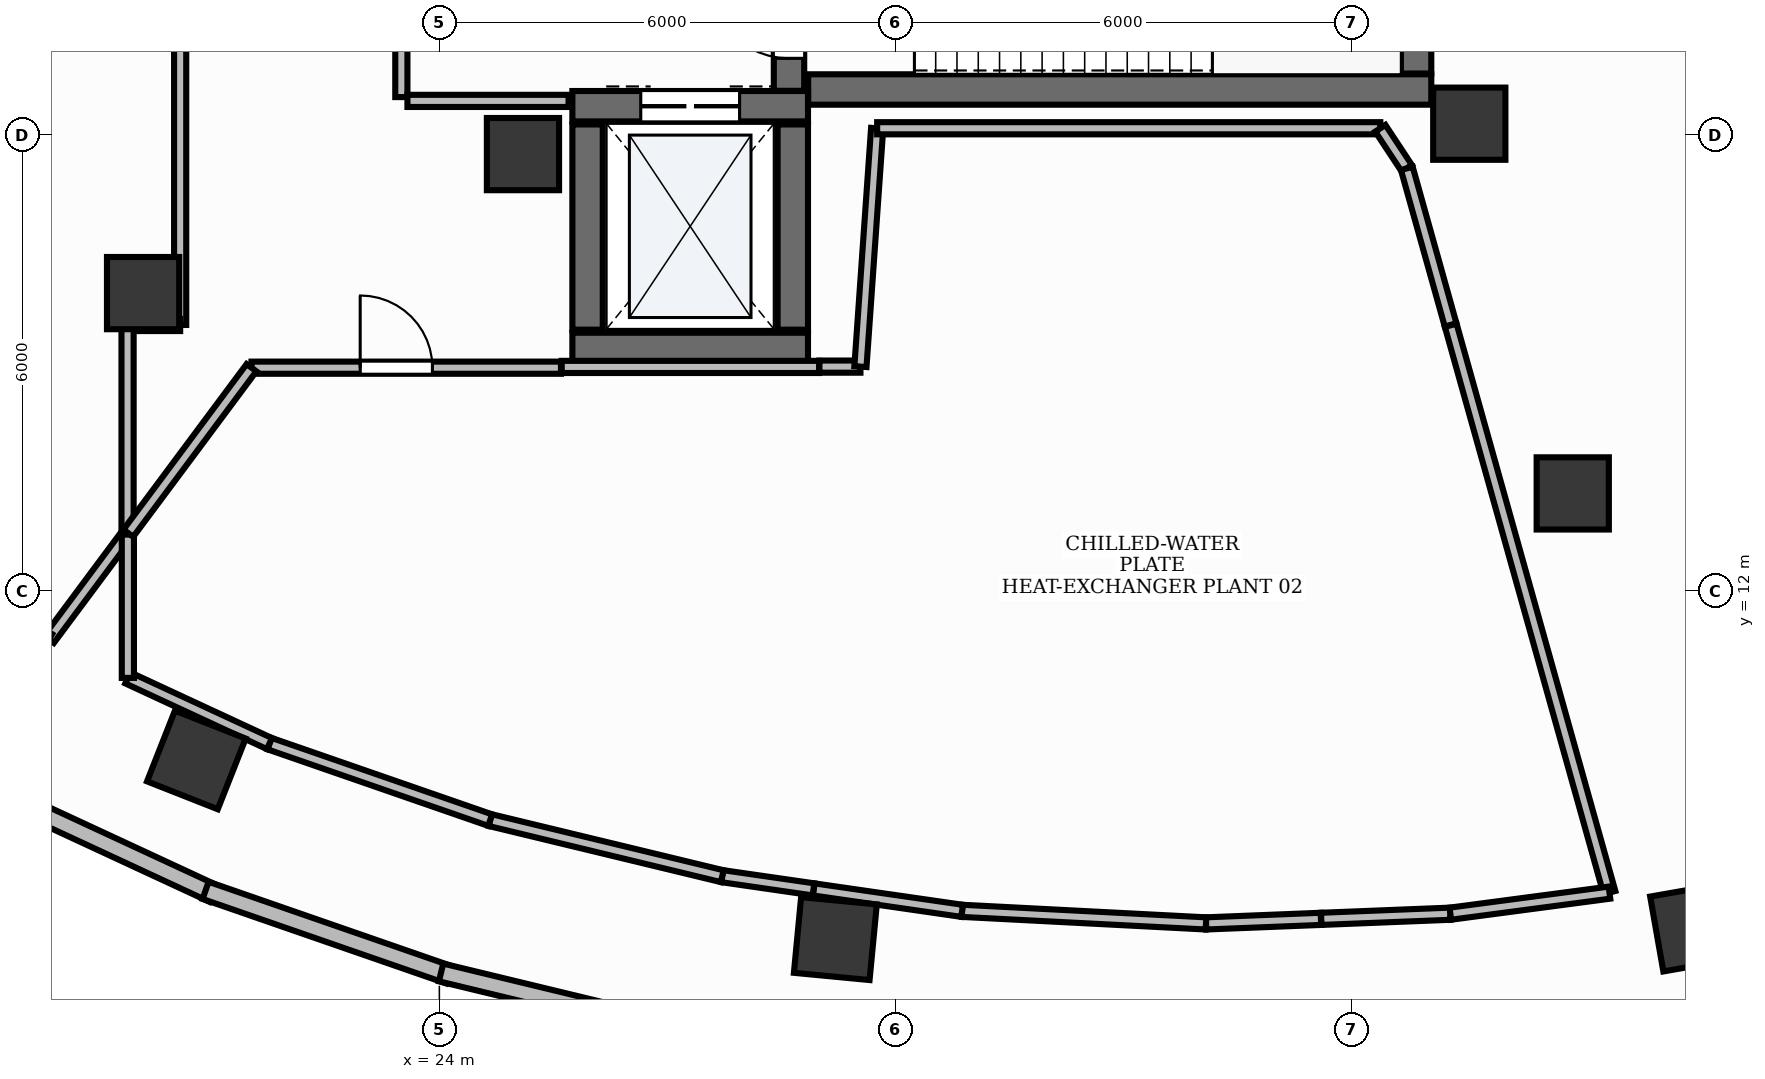
"""IFC4 building model, lengths in metres.
Left out: names, types, materials, properties, quantities, classifications, styles, units other than length and angle.
Written with IfcOpenShell. Run it as: python <this file> out.ifc"""

import sys

from ifc_helpers import new_model, si_unit, direction, frame, frame_2d, origin, origin_2d, place, context, subcontext, project, spatial, rectangle, extrude, element, fill, save


model = new_model("IFC4")
c1 = context("Model", 3, precision=1e-05, world=origin(), true_north=direction((0.0, 1.0)))
c2 = subcontext(c1, "Body", "Model", "MODEL_VIEW")
j1 = project(units=[si_unit("LENGTHUNIT", "METRE"), si_unit("PLANEANGLEUNIT", "RADIAN")], contexts=[c1])
p1 = place(None, origin())
s1 = spatial("IfcSite", under=j1, at=p1, CompositionType="ELEMENT")
p2 = place(p1, origin())
s2 = spatial("IfcBuilding", under=s1, at=p2, CompositionType="ELEMENT")
p3 = place(p2, frame((0.0, 0.0, 213.0)))
s3 = spatial("IfcBuildingStorey", under=s2, at=p3, CompositionType="ELEMENT", Elevation=213.0)
p4 = place(p3, frame((28.852, 18.6, 0.0), z_axis=(0.0, 0.0, 1.0), x_axis=(1.0, 0.0, 0.0)))
e1 = element("IfcWall", 1, at=p4, inside=s3, PredefinedType="SHEAR", context=c2, shape_type="SweptSolid", body=[
    extrude(rectangle(XDim=8.198, YDim=0.4, at=frame_2d((4.099, 0.0))), origin(), (0.0, 0.0, 1.0), 5.1),
])
p5 = place(p3, frame((36.85, 18.81, 0.0), z_axis=(0.0, 0.0, 1.0), x_axis=(0.0, 1.0, 0.0)))
e2 = element("IfcWall", 2, at=p5, inside=s3, PredefinedType="SHEAR", context=c2, shape_type="SweptSolid", body=[
    extrude(rectangle(XDim=3.08, YDim=0.4, at=frame_2d((1.54, 0.0))), origin(), (0.0, 0.0, 1.0), 5.1),
])
p6 = place(p3, frame((28.6, 18.582, 0.0), z_axis=(0.0, 0.0, 1.0), x_axis=(0.0, 1.0, 0.0)))
e3 = element("IfcWall", 3, at=p6, inside=s3, PredefinedType="SHEAR", context=c2, shape_type="SweptSolid", body=[
    extrude(rectangle(XDim=3.308, YDim=0.4, at=frame_2d((1.654, 0.0))), origin(), (0.0, 0.0, 1.0), 5.1),
])
p7 = place(p6, frame((0.428, 0.0, 0.0)))
e4 = element("IfcOpeningElement", 4, at=p7, cuts=e3, PredefinedType="OPENING", context=c2, shape_type="SweptSolid", body=[
    extrude(rectangle(XDim=1.05, YDim=2.15, at=frame_2d((0.525, 1.075))), frame((0.0, 0.215, 0.0), z_axis=(0.0, -1.0, 0.0), x_axis=(1.0, 0.0, 0.0)), (0.0, 0.0, 1.0), 0.43),
])
p8 = place(p3, frame((25.75, 15.2, 0.0), z_axis=(0.0, 0.0, 1.0), x_axis=(1.0, 0.0, 0.0)))
e5 = element("IfcWall", 5, at=p8, inside=s3, PredefinedType="SHEAR", context=c2, shape_type="SweptSolid", body=[
    extrude(rectangle(XDim=3.1, YDim=0.4, at=frame_2d((1.55, 0.0))), origin(), (0.0, 0.0, 1.0), 5.1),
])
p9 = place(p3, frame((25.75, 18.38, 0.0), z_axis=(0.0, 0.0, 1.0), x_axis=(1.0, 0.0, 0.0)))
e6 = element("IfcWall", 6, at=p9, inside=s3, PredefinedType="SHEAR", context=c2, shape_type="SweptSolid", body=[
    extrude(rectangle(XDim=3.1, YDim=0.4, at=frame_2d((1.55, 0.0))), origin(), (0.0, 0.0, 1.0), 5.1),
])
p10 = place(p9, frame((0.9, 0.0, 0.0)))
e7 = element("IfcOpeningElement", 7, at=p10, cuts=e6, PredefinedType="OPENING", context=c2, shape_type="SweptSolid", body=[
    extrude(rectangle(XDim=1.3, YDim=2.2, at=frame_2d((0.65, 1.1))), frame((0.0, 0.215, 0.0), z_axis=(0.0, -1.0, 0.0), x_axis=(1.0, 0.0, 0.0)), (0.0, 0.0, 1.0), 0.43),
])
for number, where, z_axis, x_axis in (
    (8, (25.95, 15.44, 0.0), (0.0, 0.0, 1.0), (0.0, 1.0, 0.0)),
    (9, (28.65, 15.44, 0.0), (0.0, 0.0, 1.0), (0.0, 1.0, 0.0)),
):
    element("IfcWall", number, at=place(p3, frame(where, z_axis=z_axis, x_axis=x_axis)), inside=s3, PredefinedType="SHEAR", context=c2, shape_type="SweptSolid", body=[
        extrude(rectangle(XDim=2.7, YDim=0.4, at=frame_2d((1.35, 0.0))), origin(), (0.0, 0.0, 1.0), 5.1),
    ])
for number, where, z_axis, x_axis in (
    (10, (25.1, 17.75, -0.0), (0.0, 0.0, 1.0), (1.0, 0.0, 0.0)),
    (11, (37.55, 18.15, -0.0), (0.0, 0.0, 1.0), (1.0, 0.0, 0.0)),
):
    element("IfcColumn", number, at=place(p3, frame(where, z_axis=z_axis, x_axis=x_axis)), inside=s3, PredefinedType="PILASTER", context=c2, shape_type="SweptSolid", body=[
        extrude(rectangle(XDim=0.95, YDim=0.95, at=origin_2d()), origin(), (0.0, 0.0, 1.0), 5.101),
    ])
p11 = place(p3, frame((20.102, 15.921, -0.0), z_axis=(0.0, 0.0, 1.0), x_axis=(1.0, 0.0, 0.0)))
e12 = element("IfcColumn", 12, at=p11, inside=s3, PredefinedType="COLUMN", context=c2, shape_type="SweptSolid", body=[
    extrude(rectangle(XDim=0.95, YDim=0.95, at=origin_2d()), origin(), (0.0, 0.0, 1.0), 5.101),
])
for number, where, z_axis, x_axis in (
    (13, (20.803, 9.78, -0.0), (0.0, 0.0, 1.0), (-0.93, 0.367, 0.0)),
    (14, (29.21, 7.429, -0.0), (0.0, 0.0, 1.0), (-0.995, 0.095, 0.0)),
    (15, (40.509, 7.576, -0.0), (0.0, 0.0, 1.0), (0.985, 0.173, 0.0)),
):
    element("IfcColumn", number, at=place(p3, frame(where, z_axis=z_axis, x_axis=x_axis)), inside=s3, PredefinedType="COLUMN", context=c2, shape_type="SweptSolid", body=[
        extrude(rectangle(XDim=1.0, YDim=1.0, at=origin_2d()), origin(), (0.0, 0.0, 1.0), 5.101),
    ])
p12 = place(p3, frame((38.911, 13.286, -0.0), z_axis=(0.0, 0.0, 1.0), x_axis=(1.0, 0.0, 0.0)))
e16 = element("IfcColumn", 16, at=p12, inside=s3, PredefinedType="COLUMN", context=c2, shape_type="SweptSolid", body=[
    extrude(rectangle(XDim=0.95, YDim=0.95, at=origin_2d()), origin(), (0.0, 0.0, 1.0), 5.101),
])
p13 = place(p3, frame((18.02, 9.417, 0.0), z_axis=(0.0, 0.0, 1.0), x_axis=(0.907160542428, -0.420784683967, 0.0)))
e17 = element("IfcWall", 17, at=p13, inside=s3, PredefinedType="STANDARD", context=c2, shape_type="SweptSolid", body=[
    extrude(rectangle(XDim=3.316, YDim=0.24, at=frame_2d((1.658, 0.0))), origin(), (0.0, 0.0, 1.0), 3.425),
])
p14 = place(p3, frame((20.925, 8.063, 0.0), z_axis=(0.0, 0.0, 1.0), x_axis=(0.944829367367, -0.327562920004, 0.0)))
e18 = element("IfcWall", 18, at=p14, inside=s3, PredefinedType="STANDARD", context=c2, shape_type="SweptSolid", body=[
    extrude(rectangle(XDim=3.392, YDim=0.24, at=frame_2d((1.696, 0.0))), origin(), (0.0, 0.0, 1.0), 3.825),
])
p15 = place(p3, frame((24.023, 6.984, 0.0), z_axis=(0.0, 0.0, 1.0), x_axis=(0.972029900204, -0.2348571334, 0.0)))
e19 = element("IfcWall", 19, at=p15, inside=s3, PredefinedType="STANDARD", context=c2, shape_type="SweptSolid", body=[
    extrude(rectangle(XDim=3.452, YDim=0.24, at=frame_2d((1.726, 0.0))), origin(), (0.0, 0.0, 1.0), 5.1),
])
p16 = place(p3, frame((23.5, 18.5, 0.0), z_axis=(0.0, 0.0, 1.0), x_axis=(0.0, 1.0, 0.0)))
e20 = element("IfcWall", 20, at=p16, inside=s3, PredefinedType="PARTITIONING", context=c2, shape_type="SweptSolid", body=[
    extrude(rectangle(XDim=3.4, YDim=0.16, at=frame_2d((1.7, 0.0))), origin(), (0.0, 0.0, 1.0), 3.41),
])
p17 = place(p16, frame((1.175, 0.0, 0.0)))
e21 = element("IfcOpeningElement", 21, at=p17, cuts=e20, PredefinedType="OPENING", context=c2, shape_type="SweptSolid", body=[
    extrude(rectangle(XDim=1.05, YDim=2.15, at=frame_2d((0.525, 1.075))), frame((0.0, 0.095, 0.0), z_axis=(0.0, -1.0, 0.0), x_axis=(1.0, 0.0, 0.0)), (0.0, 0.0, 1.0), 0.19),
])
p18 = place(p3, frame((23.58, 18.45, 0.0), z_axis=(0.0, 0.0, 1.0), x_axis=(1.0, 0.0, 0.0)))
e22 = element("IfcWall", 22, at=p18, inside=s3, PredefinedType="PARTITIONING", context=c2, shape_type="SweptSolid", body=[
    extrude(rectangle(XDim=2.12, YDim=0.16, at=frame_2d((1.06, 0.0))), origin(), (0.0, 0.0, 1.0), 3.41),
])
p19 = place(p3, frame((20.59, 21.44, 0.0), z_axis=(0.0, 0.0, 1.0), x_axis=(0.0, -1.0, 0.0)))
e23 = element("IfcWall", 23, at=p19, inside=s3, PredefinedType="PARTITIONING", context=c2, shape_type="SweptSolid", body=[
    extrude(rectangle(XDim=5.938, YDim=0.16, at=frame_2d((2.969, 0.0))), origin(), (0.0, 0.0, 1.0), 3.41),
])
p20 = place(p19, frame((0.24, 0.0, 0.0)))
e24 = element("IfcOpeningElement", 24, at=p20, cuts=e23, PredefinedType="OPENING", context=c2, shape_type="SweptSolid", body=[
    extrude(rectangle(XDim=0.95, YDim=2.15, at=frame_2d((0.475, 1.075))), frame((0.0, 0.095, 0.0), z_axis=(0.0, -1.0, 0.0), x_axis=(1.0, 0.0, 0.0)), (0.0, 0.0, 1.0), 0.19),
])
p21 = place(p3, frame((21.528, 14.94, 0.0), z_axis=(0.0, 0.0, 1.0), x_axis=(1.0, 0.0, 0.0)))
e25 = element("IfcWall", 25, at=p21, inside=s3, PredefinedType="PARTITIONING", context=c2, shape_type="SweptSolid", body=[
    extrude(rectangle(XDim=4.072, YDim=0.16, at=frame_2d((2.036, 0.0))), origin(), (0.0, 0.0, 1.0), 3.41),
])
p22 = place(p21, frame((1.43, 0.0, 0.0)))
e26 = element("IfcOpeningElement", 26, at=p22, cuts=e25, PredefinedType="OPENING", context=c2, shape_type="SweptSolid", body=[
    extrude(rectangle(XDim=0.95, YDim=2.15, at=frame_2d((0.475, 1.075))), frame((0.0, 0.095, 0.0), z_axis=(0.0, -1.0, 0.0), x_axis=(1.0, 0.0, 0.0)), (0.0, 0.0, 1.0), 0.19),
])
p23 = place(p3, frame((20.59, 15.502, 0.0), z_axis=(0.0, 0.0, 1.0), x_axis=(-1.0, 0.0, 0.0)))
e27 = element("IfcWall", 27, at=p23, inside=s3, PredefinedType="PARTITIONING", context=c2, shape_type="SweptSolid", body=[
    extrude(rectangle(XDim=0.688, YDim=0.16, at=frame_2d((0.344, 0.0))), origin(), (0.0, 0.0, 1.0), 3.41),
])
p24 = place(p3, frame((19.898, 15.498, 0.0), z_axis=(0.0, 0.0, 1.0), x_axis=(0.0, -1.0, 0.0)))
e28 = element("IfcWall", 28, at=p24, inside=s3, PredefinedType="PARTITIONING", context=c2, shape_type="SweptSolid", body=[
    extrude(rectangle(XDim=2.742, YDim=0.16, at=frame_2d((1.371, 0.0))), origin(), (0.0, 0.0, 1.0), 3.41),
])
p25 = place(p3, frame((19.898, 12.756, 0.0), z_axis=(0.0, 0.0, 1.0), x_axis=(-0.596972783924, -0.802261488079, 0.0)))
e29 = element("IfcWall", 29, at=p25, inside=s3, PredefinedType="PARTITIONING", context=c2, shape_type="SweptSolid", body=[
    extrude(rectangle(XDim=1.731, YDim=0.16, at=frame_2d((0.866, 0.0))), origin(), (0.0, 0.0, 1.0), 3.41),
])
p26 = place(p3, frame((18.864, 11.366, 0.0), z_axis=(0.0, 0.0, 1.0), x_axis=(-0.857533385473, 0.514428316483, 0.0)))
e30 = element("IfcWall", 30, at=p26, inside=s3, PredefinedType="PARTITIONING", context=c2, shape_type="SweptSolid", body=[
    extrude(rectangle(XDim=2.662, YDim=0.16, at=frame_2d((1.331, 0.0))), origin(), (0.0, 0.0, 1.0), 3.41),
])
p27 = place(p3, frame((25.61, 14.95, 0.0), z_axis=(0.0, 0.0, 1.0), x_axis=(1.0, 0.0, 0.0)))
e31 = element("IfcWall", 31, at=p27, inside=s3, PredefinedType="PARTITIONING", context=c2, shape_type="SweptSolid", body=[
    extrude(rectangle(XDim=3.386, YDim=0.16, at=frame_2d((1.693, 0.0))), origin(), (0.0, 0.0, 1.0), 3.41),
])
p28 = place(p3, frame((29.0, 14.954, 0.0), z_axis=(0.0, 0.0, 1.0), x_axis=(1.0, 0.0, 0.0)))
e32 = element("IfcWall", 32, at=p28, inside=s3, PredefinedType="PARTITIONING", context=c2, shape_type="SweptSolid", body=[
    extrude(rectangle(XDim=0.54, YDim=0.16, at=frame_2d((0.27, 0.0))), origin(), (0.0, 0.0, 1.0), 3.41),
])
p29 = place(p3, frame((29.54, 14.954, 0.0), z_axis=(0.0, 0.0, 1.0), x_axis=(0.069972098323, 0.997548948902, 0.0)))
e33 = element("IfcWall", 33, at=p29, inside=s3, PredefinedType="PARTITIONING", context=c2, shape_type="SweptSolid", body=[
    extrude(rectangle(XDim=3.144, YDim=0.16, at=frame_2d((1.572, 0.0))), origin(), (0.0, 0.0, 1.0), 3.41),
])
p30 = place(p3, frame((29.76, 18.09, 0.0), z_axis=(0.0, 0.0, 1.0), x_axis=(1.0, 0.0, 0.0)))
e34 = element("IfcWall", 34, at=p30, inside=s3, PredefinedType="PARTITIONING", context=c2, shape_type="SweptSolid", body=[
    extrude(rectangle(XDim=6.62, YDim=0.16, at=frame_2d((3.31, 0.0))), origin(), (0.0, 0.0, 1.0), 3.41),
])
p31 = place(p3, frame((36.379, 18.09, 0.0), z_axis=(0.0, 0.0, 1.0), x_axis=(0.550863719947, -0.834595208497, 0.0)))
e35 = element("IfcWall", 35, at=p31, inside=s3, PredefinedType="PARTITIONING", context=c2, shape_type="SweptSolid", body=[
    extrude(rectangle(XDim=0.632, YDim=0.16, at=frame_2d((0.316, 0.0))), origin(), (0.0, 0.0, 1.0), 3.41),
])
p32 = place(p3, frame((36.728, 17.562, 0.0), z_axis=(0.0, 0.0, 1.0), x_axis=(0.269485976636, -0.963004313799, 0.0)))
e36 = element("IfcWall", 36, at=p32, inside=s3, PredefinedType="PARTITIONING", context=c2, shape_type="SweptSolid", body=[
    extrude(rectangle(XDim=2.139, YDim=0.16, at=frame_2d((1.069, 0.0))), origin(), (0.0, 0.0, 1.0), 3.41),
])
p33 = place(p3, frame((37.306, 15.498, 0.0), z_axis=(0.0, 0.0, 1.0), x_axis=(0.269479200769, -0.963006209924, 0.0)))
e37 = element("IfcWall", 37, at=p33, inside=s3, PredefinedType="PARTITIONING", context=c2, shape_type="SweptSolid", body=[
    extrude(rectangle(XDim=7.75, YDim=0.16, at=frame_2d((3.875, 0.0))), origin(), (0.0, 0.0, 1.0), 3.41),
])
p34 = place(p3, frame((39.394, 8.034, 0.0), z_axis=(0.0, 0.0, 1.0), x_axis=(-0.991371547584, -0.131081862361, 0.0)))
e38 = element("IfcWall", 38, at=p34, inside=s3, PredefinedType="PARTITIONING", context=c2, shape_type="SweptSolid", body=[
    extrude(rectangle(XDim=2.114, YDim=0.16, at=frame_2d((1.057, 0.0))), origin(), (0.0, 0.0, 1.0), 3.41),
])
p35 = place(p3, frame((37.298, 7.757, 0.0), z_axis=(0.0, 0.0, 1.0), x_axis=(-0.999211721254, -0.039698061763, 0.0)))
e39 = element("IfcWall", 39, at=p35, inside=s3, PredefinedType="PARTITIONING", context=c2, shape_type="SweptSolid", body=[
    extrude(rectangle(XDim=1.697, YDim=0.16, at=frame_2d((0.849, 0.0))), origin(), (0.0, 0.0, 1.0), 3.41),
])
p36 = place(p3, frame((35.598, 7.689, 0.0), z_axis=(0.0, 0.0, 1.0), x_axis=(-0.999211494533, -0.039703767995, 0.0)))
e40 = element("IfcWall", 40, at=p36, inside=s3, PredefinedType="PARTITIONING", context=c2, shape_type="SweptSolid", body=[
    extrude(rectangle(XDim=1.513, YDim=0.16, at=frame_2d((0.756, 0.0))), origin(), (0.0, 0.0, 1.0), 3.41),
])
p37 = place(p3, frame((34.086, 7.629, 0.0), z_axis=(0.0, 0.0, 1.0), x_axis=(-0.998671869971, 0.051521802453, 0.0)))
e41 = element("IfcWall", 41, at=p37, inside=s3, PredefinedType="PARTITIONING", context=c2, shape_type="SweptSolid", body=[
    extrude(rectangle(XDim=3.213, YDim=0.16, at=frame_2d((1.606, 0.0))), origin(), (0.0, 0.0, 1.0), 3.41),
])
p38 = place(p3, frame((30.877, 7.794, 0.0), z_axis=(0.0, 0.0, 1.0), x_axis=(-0.989722906108, 0.142998493439, 0.0)))
e42 = element("IfcWall", 42, at=p38, inside=s3, PredefinedType="PARTITIONING", context=c2, shape_type="SweptSolid", body=[
    extrude(rectangle(XDim=1.972, YDim=0.16, at=frame_2d((0.986, 0.0))), origin(), (0.0, 0.0, 1.0), 3.41),
])
p39 = place(p3, frame((28.922, 8.077, 0.0), z_axis=(0.0, 0.0, 1.0), x_axis=(-0.989722656499, 0.143000221024, 0.0)))
e43 = element("IfcWall", 43, at=p39, inside=s3, PredefinedType="PARTITIONING", context=c2, shape_type="SweptSolid", body=[
    extrude(rectangle(XDim=1.212, YDim=0.16, at=frame_2d((0.606, 0.0))), origin(), (0.0, 0.0, 1.0), 3.41),
])
p40 = place(p3, frame((27.722, 8.25, 0.0), z_axis=(0.0, 0.0, 1.0), x_axis=(-0.972019203174, 0.234901401999, 0.0)))
e44 = element("IfcWall", 44, at=p40, inside=s3, PredefinedType="PARTITIONING", context=c2, shape_type="SweptSolid", body=[
    extrude(rectangle(XDim=3.141, YDim=0.16, at=frame_2d((1.57, 0.0))), origin(), (0.0, 0.0, 1.0), 3.41),
])
p41 = place(p3, frame((24.669, 8.988, 0.0), z_axis=(0.0, 0.0, 1.0), x_axis=(-0.944849967257, 0.32750349521, 0.0)))
e45 = element("IfcWall", 45, at=p41, inside=s3, PredefinedType="PARTITIONING", context=c2, shape_type="SweptSolid", body=[
    extrude(rectangle(XDim=3.073, YDim=0.16, at=frame_2d((1.536, 0.0))), origin(), (0.0, 0.0, 1.0), 3.41),
])
p42 = place(p3, frame((21.765, 9.995, 0.0), z_axis=(0.0, 0.0, 1.0), x_axis=(-0.907143514613, 0.420821391918, 0.0)))
e46 = element("IfcWall", 46, at=p42, inside=s3, PredefinedType="PARTITIONING", context=c2, shape_type="SweptSolid", body=[
    extrude(rectangle(XDim=2.054, YDim=0.16, at=frame_2d((1.027, 0.0))), origin(), (0.0, 0.0, 1.0), 3.41),
])
p43 = place(p3, frame((19.902, 10.859, 0.0), z_axis=(0.0, 0.0, 1.0), x_axis=(0.0, 1.0, 0.0)))
e47 = element("IfcWall", 47, at=p43, inside=s3, PredefinedType="PARTITIONING", context=c2, shape_type="SweptSolid", body=[
    extrude(rectangle(XDim=1.885, YDim=0.16, at=frame_2d((0.943, 0.0))), origin(), (0.0, 0.0, 1.0), 3.41),
])
p44 = place(p3, frame((19.908, 12.762, 0.0), z_axis=(0.0, 0.0, 1.0), x_axis=(0.596987882784, 0.802250252607, 0.0)))
e48 = element("IfcWall", 48, at=p44, inside=s3, PredefinedType="PARTITIONING", context=c2, shape_type="SweptSolid", body=[
    extrude(rectangle(XDim=2.714, YDim=0.16, at=frame_2d((1.357, 0.0))), origin(), (0.0, 0.0, 1.0), 3.41),
])
p45 = place(p7, origin())
e49 = element("IfcDoor", 49, at=p45, inside=s3, OperationType="SINGLE_SWING_RIGHT", PredefinedType="DOOR", context=c2, shape_type="SweptSolid", body=[
    extrude(rectangle(XDim=1.05, YDim=2.15, at=frame_2d((0.525, 1.075))), frame((0.0, 0.025, 0.0), z_axis=(0.0, -1.0, 0.0), x_axis=(1.0, 0.0, 0.0)), (0.0, 0.0, 1.0), 0.05),
])
fill(e4, e49)
p46 = place(p10, origin())
e50 = element("IfcDoor", 50, at=p46, inside=s3, OperationType="DOUBLE_DOOR_SLIDING", PredefinedType="DOOR", context=c2, shape_type="SweptSolid", body=[
    extrude(rectangle(XDim=1.3, YDim=2.2, at=frame_2d((0.65, 1.1))), frame((0.0, 0.025, 0.0), z_axis=(0.0, -1.0, 0.0), x_axis=(1.0, 0.0, 0.0)), (0.0, 0.0, 1.0), 0.05),
])
fill(e7, e50)
p47 = place(p22, origin())
e51 = element("IfcDoor", 51, at=p47, inside=s3, OperationType="SINGLE_SWING_LEFT", PredefinedType="DOOR", context=c2, shape_type="SweptSolid", body=[
    extrude(rectangle(XDim=0.95, YDim=2.15, at=frame_2d((0.475, 1.075))), frame((0.0, 0.025, 0.0), z_axis=(0.0, -1.0, 0.0), x_axis=(1.0, 0.0, 0.0)), (0.0, 0.0, 1.0), 0.05),
])
fill(e26, e51)
save(model, sys.argv[1])
